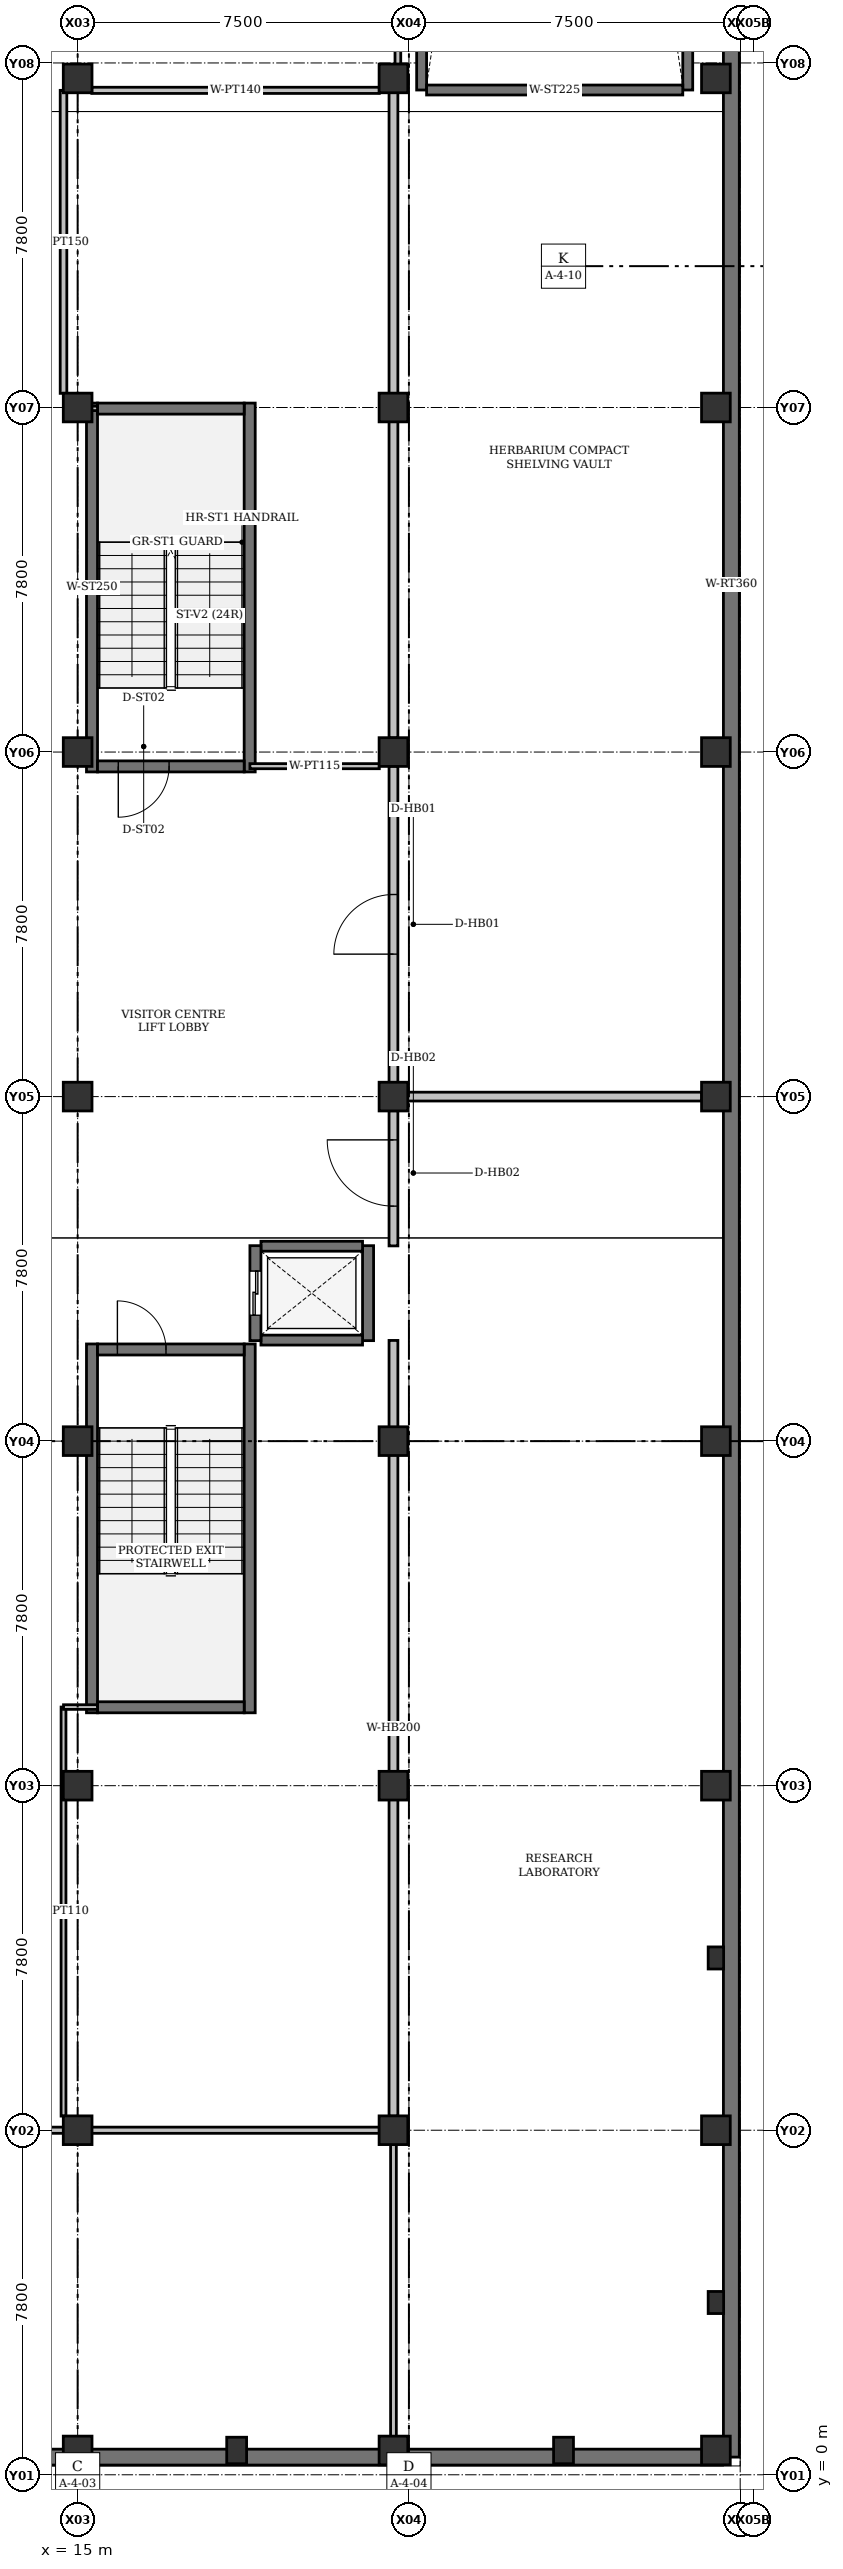
"""IFC4 building model, lengths in metres.
Left out: names, types, materials, properties, quantities, classifications, styles, units other than length and angle.
Written with IfcOpenShell. Run it as: python <this file> out.ifc"""

import sys

from ifc_helpers import new_model, si_unit, direction, frame, frame_2d, origin, origin_2d, place, context, subcontext, project, spatial, rectangle, extrude, element, fill, save


model = new_model("IFC4")
c1 = context("Model", 3, precision=1e-05, world=origin(), true_north=direction((0.0, 1.0)))
c2 = subcontext(c1, "Body", "Model", "MODEL_VIEW")
j1 = project(units=[si_unit("LENGTHUNIT", "METRE"), si_unit("PLANEANGLEUNIT", "RADIAN")], contexts=[c1])
p1 = place(None, origin())
s1 = spatial("IfcSite", under=j1, at=p1, CompositionType="ELEMENT")
p2 = place(p1, origin())
s2 = spatial("IfcBuilding", under=s1, at=p2, CompositionType="ELEMENT")
p3 = place(p2, frame((0.0, 0.0, -4.2)))
s3 = spatial("IfcBuildingStorey", under=s2, at=p3, CompositionType="ELEMENT", Elevation=-4.2)
for number, where, z_axis, x_axis in (
    (1, (15.0, 0.55, 0.0), (0.0, 0.0, 1.0), (1.0, 0.0, 0.0)),
    (2, (15.0, 7.8, 0.0), (0.0, 0.0, 1.0), (1.0, 0.0, 0.0)),
    (3, (15.0, 15.6, 0.0), (0.0, 0.0, 1.0), (1.0, 0.0, 0.0)),
    (4, (15.0, 23.4, 0.0), (0.0, 0.0, 1.0), (1.0, 0.0, 0.0)),
    (5, (15.0, 31.2, 0.0), (0.0, 0.0, 1.0), (1.0, 0.0, 0.0)),
    (6, (15.0, 39.0, 0.0), (0.0, 0.0, 1.0), (1.0, 0.0, 0.0)),
    (7, (15.0, 46.8, 0.0), (0.0, 0.0, 1.0), (1.0, 0.0, 0.0)),
    (8, (15.0, 54.25, 0.0), (0.0, 0.0, 1.0), (1.0, 0.0, 0.0)),
    (9, (22.15, 0.55, 0.0), (0.0, 0.0, 1.0), (1.0, 0.0, 0.0)),
    (10, (22.15, 7.8, 0.0), (0.0, 0.0, 1.0), (1.0, 0.0, 0.0)),
    (11, (22.15, 15.6, 0.0), (0.0, 0.0, 1.0), (1.0, 0.0, 0.0)),
    (12, (22.15, 23.4, 0.0), (0.0, 0.0, 1.0), (1.0, 0.0, 0.0)),
    (13, (22.15, 31.2, 0.0), (0.0, 0.0, 1.0), (1.0, 0.0, 0.0)),
    (14, (22.15, 39.0, 0.0), (0.0, 0.0, 1.0), (1.0, 0.0, 0.0)),
    (15, (22.15, 46.8, 0.0), (0.0, 0.0, 1.0), (1.0, 0.0, 0.0)),
    (16, (22.15, 54.25, 0.0), (0.0, 0.0, 1.0), (1.0, 0.0, 0.0)),
    (17, (29.45, 0.55, 0.0), (0.0, 0.0, 1.0), (1.0, 0.0, 0.0)),
    (18, (29.45, 7.8, 0.0), (0.0, 0.0, 1.0), (1.0, 0.0, 0.0)),
    (19, (29.45, 15.6, 0.0), (0.0, 0.0, 1.0), (1.0, 0.0, 0.0)),
    (20, (29.45, 23.4, 0.0), (0.0, 0.0, 1.0), (1.0, 0.0, 0.0)),
    (21, (29.45, 31.2, 0.0), (0.0, 0.0, 1.0), (1.0, 0.0, 0.0)),
    (22, (29.45, 39.0, 0.0), (0.0, 0.0, 1.0), (1.0, 0.0, 0.0)),
    (23, (29.45, 46.8, 0.0), (0.0, 0.0, 1.0), (1.0, 0.0, 0.0)),
    (24, (29.45, 54.25, 0.0), (0.0, 0.0, 1.0), (1.0, 0.0, 0.0)),
):
    element("IfcColumn", number, at=place(p3, frame(where, z_axis=z_axis, x_axis=x_axis)), inside=s3, PredefinedType="COLUMN", context=c2, shape_type="SweptSolid", body=[
        extrude(rectangle(XDim=0.65, YDim=0.65, at=origin_2d()), origin(), (0.0, 0.0, 1.0), 4.2),
    ])
for number, where, z_axis, x_axis in (
    (25, (18.6, 0.55, 0.0), (0.0, 0.0, 1.0), (1.0, 0.0, 0.0)),
    (26, (26.0, 0.55, 0.0), (0.0, 0.0, 1.0), (1.0, 0.0, 0.0)),
):
    element("IfcColumn", number, at=place(p3, frame(where, z_axis=z_axis, x_axis=x_axis)), inside=s3, PredefinedType="PILASTER", context=c2, shape_type="SweptSolid", body=[
        extrude(rectangle(XDim=0.45, YDim=0.6, at=origin_2d()), origin(), (0.0, 0.0, 1.0), 4.2),
    ])
for number, where, z_axis, x_axis in (
    (27, (29.45, 3.9, 0.0), (0.0, 0.0, 1.0), (1.0, 0.0, 0.0)),
    (28, (29.45, 11.7, 0.0), (0.0, 0.0, 1.0), (1.0, 0.0, 0.0)),
):
    element("IfcColumn", number, at=place(p3, frame(where, z_axis=z_axis, x_axis=x_axis)), inside=s3, PredefinedType="PILASTER", context=c2, shape_type="SweptSolid", body=[
        extrude(rectangle(XDim=0.35, YDim=0.5, at=origin_2d()), origin(), (0.0, 0.0, 1.0), 4.2),
    ])
p4 = place(p3, frame((29.8, 85.2, 0.0), z_axis=(0.0, 0.0, 1.0), x_axis=(0.0, -1.0, 0.0)))
e29 = element("IfcWall", 29, at=p4, inside=s3, PredefinedType="USERDEFINED", context=c2, shape_type="SweptSolid", body=[
    extrude(rectangle(XDim=84.8, YDim=0.36, at=frame_2d((42.4, 0.0))), origin(), (0.0, 0.0, 1.0), 3.95),
])
p5 = place(p3, frame((29.6, 0.4, 0.0), z_axis=(0.0, 0.0, 1.0), x_axis=(-1.0, 0.0, 0.0)))
e30 = element("IfcWall", 30, at=p5, inside=s3, PredefinedType="USERDEFINED", context=c2, shape_type="SweptSolid", body=[
    extrude(rectangle(XDim=28.95, YDim=0.36, at=frame_2d((14.475, 0.0))), origin(), (0.0, 0.0, 1.0), 3.95),
])
for number, where, z_axis, x_axis in (
    (31, (15.325, 17.25, 0.0), (0.0, 0.0, 1.0), (0.0, 1.0, 0.0)),
    (32, (18.895, 17.25, 0.0), (0.0, 0.0, 1.0), (0.0, 1.0, 0.0)),
):
    element("IfcWall", number, at=place(p3, frame(where, z_axis=z_axis, x_axis=x_axis)), inside=s3, PredefinedType="SHEAR", context=c2, shape_type="SweptSolid", body=[
        extrude(rectangle(XDim=8.35, YDim=0.25, at=frame_2d((4.175, 0.0))), origin(), (0.0, 0.0, 1.0), 4.2),
    ])
p6 = place(p3, frame((15.45, 17.375, 0.0), z_axis=(0.0, 0.0, 1.0), x_axis=(1.0, 0.0, 0.0)))
e33 = element("IfcWall", 33, at=p6, inside=s3, PredefinedType="SHEAR", context=c2, shape_type="SweptSolid", body=[
    extrude(rectangle(XDim=3.32, YDim=0.25, at=frame_2d((1.66, 0.0))), origin(), (0.0, 0.0, 1.0), 4.2),
])
p7 = place(p3, frame((15.45, 25.475, 0.0), z_axis=(0.0, 0.0, 1.0), x_axis=(1.0, 0.0, 0.0)))
e34 = element("IfcWall", 34, at=p7, inside=s3, PredefinedType="SHEAR", context=c2, shape_type="SweptSolid", body=[
    extrude(rectangle(XDim=3.32, YDim=0.25, at=frame_2d((1.66, 0.0))), origin(), (0.0, 0.0, 1.0), 4.2),
])
p8 = place(p7, frame((0.45, 0.0, 0.0)))
e35 = element("IfcOpeningElement", 35, at=p8, cuts=e34, PredefinedType="OPENING", context=c2, shape_type="SweptSolid", body=[
    extrude(rectangle(XDim=1.1, YDim=2.15, at=frame_2d((0.55, 1.075))), frame((0.0, 0.125, 0.0), z_axis=(0.0, -1.0, 0.0), x_axis=(1.0, 0.0, 0.0)), (0.0, 0.0, 1.0), 0.25),
])
for number, where, z_axis, x_axis in (
    (36, (15.325, 38.55, 0.0), (0.0, 0.0, 1.0), (0.0, 1.0, 0.0)),
    (37, (18.895, 38.55, 0.0), (0.0, 0.0, 1.0), (0.0, 1.0, 0.0)),
):
    element("IfcWall", number, at=place(p3, frame(where, z_axis=z_axis, x_axis=x_axis)), inside=s3, PredefinedType="SHEAR", context=c2, shape_type="SweptSolid", body=[
        extrude(rectangle(XDim=8.35, YDim=0.25, at=frame_2d((4.175, 0.0))), origin(), (0.0, 0.0, 1.0), 4.2),
    ])
p9 = place(p3, frame((15.45, 46.775, 0.0), z_axis=(0.0, 0.0, 1.0), x_axis=(1.0, 0.0, 0.0)))
e38 = element("IfcWall", 38, at=p9, inside=s3, PredefinedType="SHEAR", context=c2, shape_type="SweptSolid", body=[
    extrude(rectangle(XDim=3.32, YDim=0.25, at=frame_2d((1.66, 0.0))), origin(), (0.0, 0.0, 1.0), 4.2),
])
p10 = place(p3, frame((18.77, 38.675, 0.0), z_axis=(0.0, 0.0, 1.0), x_axis=(-1.0, 0.0, 0.0)))
e39 = element("IfcWall", 39, at=p10, inside=s3, PredefinedType="SHEAR", context=c2, shape_type="SweptSolid", body=[
    extrude(rectangle(XDim=3.32, YDim=0.25, at=frame_2d((1.66, 0.0))), origin(), (0.0, 0.0, 1.0), 4.2),
])
p11 = place(p10, frame((1.7, 0.0, 0.0)))
e40 = element("IfcOpeningElement", 40, at=p11, cuts=e39, PredefinedType="OPENING", context=c2, shape_type="SweptSolid", body=[
    extrude(rectangle(XDim=1.15, YDim=2.15, at=frame_2d((0.575, 1.075))), frame((0.0, 0.125, 0.0), z_axis=(0.0, -1.0, 0.0), x_axis=(1.0, 0.0, 0.0)), (0.0, 0.0, 1.0), 0.25),
])
p12 = place(p3, frame((21.575, 25.675, 0.0), z_axis=(0.0, 0.0, 1.0), x_axis=(0.0, 1.0, 0.0)))
e41 = element("IfcWall", 41, at=p12, inside=s3, PredefinedType="SHEAR", context=c2, shape_type="SweptSolid", body=[
    extrude(rectangle(XDim=2.15, YDim=0.25, at=frame_2d((1.075, 0.0))), origin(), (0.0, 0.0, 1.0), 4.2),
])
for number, where, z_axis, x_axis in (
    (42, (19.15, 25.688, 0.0), (0.0, 0.0, 1.0), (1.0, 0.0, 0.0)),
    (43, (19.15, 27.812, 0.0), (0.0, 0.0, 1.0), (1.0, 0.0, 0.0)),
):
    element("IfcWall", number, at=place(p3, frame(where, z_axis=z_axis, x_axis=x_axis)), inside=s3, PredefinedType="SHEAR", context=c2, shape_type="SweptSolid", body=[
        extrude(rectangle(XDim=2.3, YDim=0.225, at=frame_2d((1.15, 0.0))), origin(), (0.0, 0.0, 1.0), 4.2),
    ])
p13 = place(p3, frame((19.025, 25.675, 0.0), z_axis=(0.0, 0.0, 1.0), x_axis=(0.0, 1.0, 0.0)))
e44 = element("IfcWall", 44, at=p13, inside=s3, PredefinedType="SHEAR", context=c2, shape_type="SweptSolid", body=[
    extrude(rectangle(XDim=2.15, YDim=0.25, at=frame_2d((1.075, 0.0))), origin(), (0.0, 0.0, 1.0), 4.2),
])
p14 = place(p13, frame((0.575, 0.0, 0.0)))
e45 = element("IfcOpeningElement", 45, at=p14, cuts=e44, PredefinedType="OPENING", context=c2, shape_type="SweptSolid", body=[
    extrude(rectangle(XDim=1.0, YDim=2.1, at=frame_2d((0.5, 1.05))), frame((0.0, 0.125, 0.0), z_axis=(0.0, -1.0, 0.0), x_axis=(1.0, 0.0, 0.0)), (0.0, 0.0, 1.0), 0.25),
])
for number, where, z_axis, x_axis in (
    (46, (22.788, 53.988, 0.0), (0.0, 0.0, 1.0), (0.0, 1.0, 0.0)),
    (47, (28.812, 53.988, 0.0), (0.0, 0.0, 1.0), (0.0, 1.0, 0.0)),
):
    element("IfcWall", number, at=place(p3, frame(where, z_axis=z_axis, x_axis=x_axis)), inside=s3, PredefinedType="SHEAR", context=c2, shape_type="SweptSolid", body=[
        extrude(rectangle(XDim=38.512, YDim=0.225, at=frame_2d((19.256, 0.0))), origin(), (0.0, 0.0, 1.0), 3.92),
    ])
p15 = place(p3, frame((22.9, 53.988, 0.0), z_axis=(0.0, 0.0, 1.0), x_axis=(1.0, 0.0, 0.0)))
e48 = element("IfcWall", 48, at=p15, inside=s3, PredefinedType="SHEAR", context=c2, shape_type="SweptSolid", body=[
    extrude(rectangle(XDim=5.8, YDim=0.225, at=frame_2d((2.9, 0.0))), origin(), (0.0, 0.0, 1.0), 3.92),
])
p16 = place(p3, frame((22.15, 8.12, 0.0), z_axis=(0.0, 0.0, 1.0), x_axis=(0.0, 1.0, 0.0)))
e49 = element("IfcWall", 49, at=p16, inside=s3, PredefinedType="SOLIDWALL", context=c2, shape_type="SweptSolid", body=[
    extrude(rectangle(XDim=17.56, YDim=0.2, at=frame_2d((8.78, 0.0))), origin(), (0.0, 0.0, 1.0), 3.477),
])
p17 = place(p3, frame((22.15, 27.82, 0.0), z_axis=(0.0, 0.0, 1.0), x_axis=(0.0, 1.0, 0.0)))
e50 = element("IfcWall", 50, at=p17, inside=s3, PredefinedType="SOLIDWALL", context=c2, shape_type="SweptSolid", body=[
    extrude(rectangle(XDim=3.06, YDim=0.2, at=frame_2d((1.53, 0.0))), origin(), (0.0, 0.0, 1.0), 3.477),
])
p18 = place(p17, frame((0.9, 0.0, 0.0)))
e51 = element("IfcOpeningElement", 51, at=p18, cuts=e50, PredefinedType="OPENING", context=c2, shape_type="SweptSolid", body=[
    extrude(rectangle(XDim=1.5, YDim=2.3, at=frame_2d((0.75, 1.15))), frame((0.0, 0.1, 0.0), z_axis=(0.0, -1.0, 0.0), x_axis=(1.0, 0.0, 0.0)), (0.0, 0.0, 1.0), 0.2),
])
p19 = place(p3, frame((22.15, 31.52, 0.0), z_axis=(0.0, 0.0, 1.0), x_axis=(0.0, 1.0, 0.0)))
e52 = element("IfcWall", 52, at=p19, inside=s3, PredefinedType="SOLIDWALL", context=c2, shape_type="SweptSolid", body=[
    extrude(rectangle(XDim=7.16, YDim=0.2, at=frame_2d((3.58, 0.0))), origin(), (0.0, 0.0, 1.0), 3.477),
])
p20 = place(p19, frame((2.905, 0.0, 0.0)))
e53 = element("IfcOpeningElement", 53, at=p20, cuts=e52, PredefinedType="OPENING", context=c2, shape_type="SweptSolid", body=[
    extrude(rectangle(XDim=1.35, YDim=2.25, at=frame_2d((0.675, 1.125))), frame((0.0, 0.1, 0.0), z_axis=(0.0, -1.0, 0.0), x_axis=(1.0, 0.0, 0.0)), (0.0, 0.0, 1.0), 0.2),
])
p21 = place(p3, frame((22.15, 39.32, 0.0), z_axis=(0.0, 0.0, 1.0), x_axis=(0.0, 1.0, 0.0)))
e54 = element("IfcWall", 54, at=p21, inside=s3, PredefinedType="SOLIDWALL", context=c2, shape_type="SweptSolid", body=[
    extrude(rectangle(XDim=14.63, YDim=0.2, at=frame_2d((7.315, 0.0))), origin(), (0.0, 0.0, 1.0), 3.477),
])
p22 = place(p3, frame((29.13, 31.2, 0.0), z_axis=(0.0, 0.0, 1.0), x_axis=(-1.0, 0.0, 0.0)))
e55 = element("IfcWall", 55, at=p22, inside=s3, PredefinedType="SOLIDWALL", context=c2, shape_type="SweptSolid", body=[
    extrude(rectangle(XDim=6.66, YDim=0.2, at=frame_2d((3.33, 0.0))), origin(), (0.0, 0.0, 1.0), 3.401),
])
p23 = place(p3, frame((18.9, 38.68, 0.0), z_axis=(0.0, 0.0, 1.0), x_axis=(1.0, 0.0, 0.0)))
e56 = element("IfcWall", 56, at=p23, inside=s3, PredefinedType="PARTITIONING", context=c2, shape_type="SweptSolid", body=[
    extrude(rectangle(XDim=2.93, YDim=0.115, at=frame_2d((1.465, 0.0))), origin(), (0.0, 0.0, 1.0), 3.95),
])
p24 = place(p3, frame((14.68, 8.12, 0.0), z_axis=(0.0, 0.0, 1.0), x_axis=(0.0, 1.0, 0.0)))
e57 = element("IfcWall", 57, at=p24, inside=s3, PredefinedType="PARTITIONING", context=c2, shape_type="SweptSolid", body=[
    extrude(rectangle(XDim=9.26, YDim=0.11, at=frame_2d((4.63, 0.0))), origin(), (0.0, 0.0, 1.0), 3.401),
])
p25 = place(p3, frame((14.68, 17.38, 0.0), z_axis=(0.0, 0.0, 1.0), x_axis=(1.0, 0.0, 0.0)))
e58 = element("IfcWall", 58, at=p25, inside=s3, PredefinedType="PARTITIONING", context=c2, shape_type="SweptSolid", body=[
    extrude(rectangle(XDim=0.77, YDim=0.105, at=frame_2d((0.385, 0.0))), origin(), (0.0, 0.0, 1.0), 3.477),
])
p26 = place(p3, frame((14.68, 46.78, 0.0), z_axis=(0.0, 0.0, 1.0), x_axis=(1.0, 0.0, 0.0)))
e59 = element("IfcWall", 59, at=p26, inside=s3, PredefinedType="PARTITIONING", context=c2, shape_type="SweptSolid", body=[
    extrude(rectangle(XDim=0.77, YDim=0.1, at=frame_2d((0.385, 0.0))), origin(), (0.0, 0.0, 1.0), 3.401),
])
p27 = place(p3, frame((14.68, 53.98, 0.0), z_axis=(0.0, 0.0, 1.0), x_axis=(0.0, -1.0, 0.0)))
e60 = element("IfcWall", 60, at=p27, inside=s3, PredefinedType="PARTITIONING", context=c2, shape_type="SweptSolid", body=[
    extrude(rectangle(XDim=6.86, YDim=0.15, at=frame_2d((3.43, 0.0))), origin(), (0.0, 0.0, 1.0), 3.627),
])
p28 = place(p3, frame((21.83, 53.98, 0.0), z_axis=(0.0, 0.0, 1.0), x_axis=(-1.0, 0.0, 0.0)))
e61 = element("IfcWall", 61, at=p28, inside=s3, PredefinedType="PARTITIONING", context=c2, shape_type="SweptSolid", body=[
    extrude(rectangle(XDim=6.51, YDim=0.14, at=frame_2d((3.255, 0.0))), origin(), (0.0, 0.0, 1.0), 3.95),
])
p29 = place(p3, frame((22.25, 54.57, 0.0), z_axis=(0.0, 0.0, 1.0), x_axis=(0.0, 1.0, 0.0)))
e62 = element("IfcWall", 62, at=p29, inside=s3, PredefinedType="PARTITIONING", context=c2, shape_type="SweptSolid", body=[
    extrude(rectangle(XDim=21.23, YDim=0.13, at=frame_2d((10.615, 0.0))), origin(), (0.0, 0.0, 1.0), 3.401),
])
p30 = place(p3, frame((12.55, 7.8, 0.0), z_axis=(0.0, 0.0, 1.0), x_axis=(1.0, 0.0, 0.0)))
e63 = element("IfcWall", 63, at=p30, inside=s3, PredefinedType="PARTITIONING", context=c2, shape_type="SweptSolid", body=[
    extrude(rectangle(XDim=9.28, YDim=0.14, at=frame_2d((4.64, 0.0))), origin(), (0.0, 0.0, 1.0), 3.401),
])
p31 = place(p3, frame((22.15, 0.6, 0.0), z_axis=(0.0, 0.0, 1.0), x_axis=(0.0, 1.0, 0.0)))
e64 = element("IfcWall", 64, at=p31, inside=s3, PredefinedType="PARTITIONING", context=c2, shape_type="SweptSolid", body=[
    extrude(rectangle(XDim=6.88, YDim=0.13, at=frame_2d((3.44, 0.0))), origin(), (0.0, 0.0, 1.0), 3.477),
])
p32 = place(p8, origin())
e65 = element("IfcDoor", 65, at=p32, inside=s3, OperationType="SINGLE_SWING_LEFT", PredefinedType="DOOR", context=c2, shape_type="SweptSolid", body=[
    extrude(rectangle(XDim=1.1, YDim=2.15, at=frame_2d((0.55, 1.075))), frame((0.0, 0.025, 0.0), z_axis=(0.0, -1.0, 0.0), x_axis=(1.0, 0.0, 0.0)), (0.0, 0.0, 1.0), 0.05),
])
fill(e35, e65)
p33 = place(p11, origin())
e66 = element("IfcDoor", 66, at=p33, inside=s3, OperationType="SINGLE_SWING_RIGHT", PredefinedType="DOOR", context=c2, shape_type="SweptSolid", body=[
    extrude(rectangle(XDim=1.15, YDim=2.15, at=frame_2d((0.575, 1.075))), frame((0.0, 0.025, 0.0), z_axis=(0.0, -1.0, 0.0), x_axis=(1.0, 0.0, 0.0)), (0.0, 0.0, 1.0), 0.05),
])
fill(e40, e66)
p34 = place(p14, origin())
e67 = element("IfcDoor", 67, at=p34, inside=s3, OperationType="SLIDING_TO_LEFT", PredefinedType="DOOR", context=c2, shape_type="SweptSolid", body=[
    extrude(rectangle(XDim=1.0, YDim=2.1, at=frame_2d((0.5, 1.05))), frame((0.0, 0.025, 0.0), z_axis=(0.0, -1.0, 0.0), x_axis=(1.0, 0.0, 0.0)), (0.0, 0.0, 1.0), 0.05),
])
fill(e45, e67)
p35 = place(p18, origin())
e68 = element("IfcDoor", 68, at=p35, inside=s3, OperationType="SINGLE_SWING_RIGHT", PredefinedType="DOOR", context=c2, shape_type="SweptSolid", body=[
    extrude(rectangle(XDim=1.5, YDim=2.3, at=frame_2d((0.75, 1.15))), frame((0.0, 0.025, 0.0), z_axis=(0.0, -1.0, 0.0), x_axis=(1.0, 0.0, 0.0)), (0.0, 0.0, 1.0), 0.05),
])
fill(e51, e68)
p36 = place(p20, origin())
e69 = element("IfcDoor", 69, at=p36, inside=s3, OperationType="SINGLE_SWING_LEFT", PredefinedType="DOOR", context=c2, shape_type="SweptSolid", body=[
    extrude(rectangle(XDim=1.35, YDim=2.25, at=frame_2d((0.675, 1.125))), frame((0.0, 0.025, 0.0), z_axis=(0.0, -1.0, 0.0), x_axis=(1.0, 0.0, 0.0)), (0.0, 0.0, 1.0), 0.05),
])
fill(e53, e69)
save(model, sys.argv[1])
